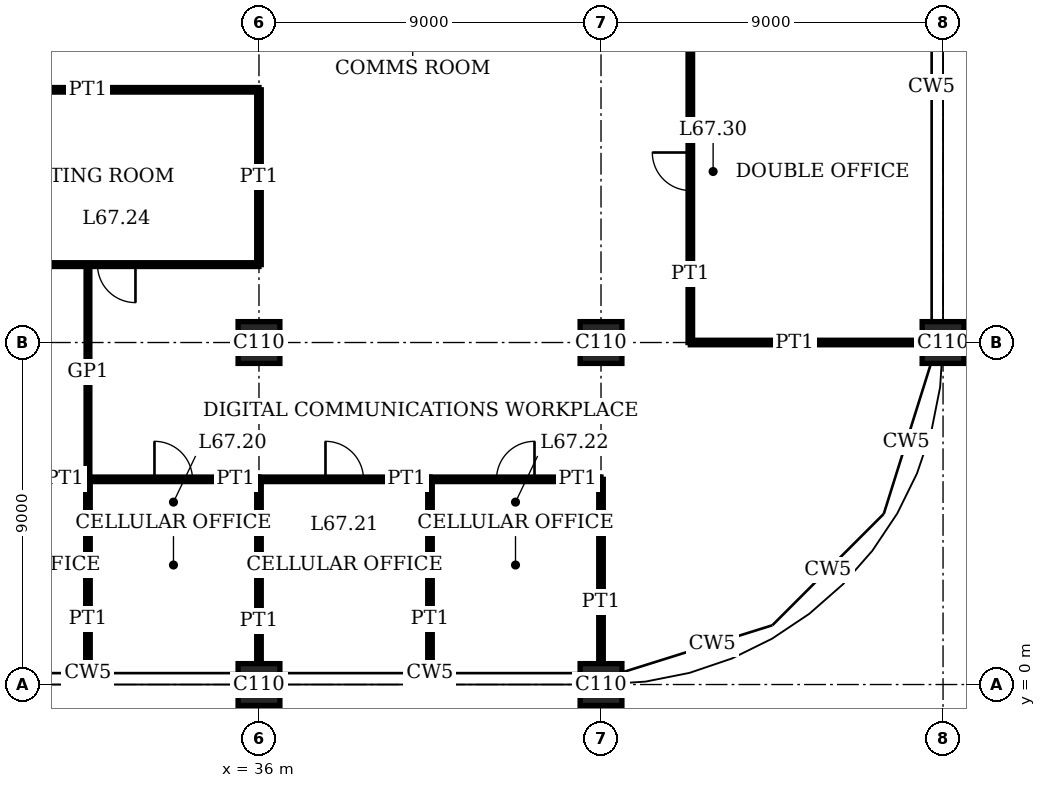
"""IFC4 building model, lengths in metres.
Left out: names, types, materials, properties, quantities, classifications, styles, units other than length and angle.
Written with IfcOpenShell. Run it as: python <this file> out.ifc"""

import sys

from ifc_helpers import new_model, si_unit, direction, frame, frame_2d, origin, origin_2d, place, context, subcontext, project, spatial, rectangle, extrude, element, fill, save


model = new_model("IFC4")
c1 = context("Model", 3, precision=1e-05, world=origin(), true_north=direction((0.0, 1.0)))
c2 = subcontext(c1, "Body", "Model", "MODEL_VIEW")
j1 = project(units=[si_unit("LENGTHUNIT", "METRE"), si_unit("PLANEANGLEUNIT", "RADIAN")], contexts=[c1])
p1 = place(None, origin())
s1 = spatial("IfcSite", under=j1, at=p1, CompositionType="ELEMENT")
p2 = place(p1, origin())
s2 = spatial("IfcBuilding", under=s1, at=p2, CompositionType="ELEMENT")
p3 = place(p2, frame((0.0, 0.0, 275.4)))
s3 = spatial("IfcBuildingStorey", under=s2, at=p3, CompositionType="ELEMENT", Elevation=275.4)
for number, where, z_axis, x_axis in (
    (1, (36.0, 0.0, 0.0), (0.0, 0.0, 1.0), (1.0, 0.0, 0.0)),
    (2, (36.0, 9.0, 0.0), (0.0, 0.0, 1.0), (1.0, 0.0, 0.0)),
    (3, (45.0, 0.0, 0.0), (0.0, 0.0, 1.0), (1.0, 0.0, 0.0)),
    (4, (45.0, 9.0, 0.0), (0.0, 0.0, 1.0), (1.0, 0.0, 0.0)),
    (5, (54.0, 9.0, 0.0), (0.0, 0.0, 1.0), (1.0, 0.0, 0.0)),
):
    element("IfcColumn", number, at=place(p3, frame(where, z_axis=z_axis, x_axis=x_axis)), inside=s3, PredefinedType="COLUMN", context=c2, shape_type="SweptSolid", body=[
        extrude(rectangle(XDim=1.1, YDim=1.1, at=origin_2d()), origin(), (0.0, 0.0, 1.0), 4.0),
    ])
p4 = place(p3, frame((27.0, 5.4, 0.0), z_axis=(0.0, 0.0, 1.0), x_axis=(1.0, 0.0, 0.0)))
e6 = element("IfcWall", 6, at=p4, inside=s3, PredefinedType="PARTITIONING", context=c2, shape_type="SweptSolid", body=[
    extrude(rectangle(XDim=4.5, YDim=0.12, at=frame_2d((2.25, 0.0))), origin(), (0.0, 0.0, 1.0), 3.75),
])
p5 = place(p4, frame((1.75, 0.0, 0.0)))
e7 = element("IfcOpeningElement", 7, at=p5, cuts=e6, PredefinedType="OPENING", context=c2, shape_type="SweptSolid", body=[
    extrude(rectangle(XDim=1.0, YDim=2.4, at=frame_2d((0.5, 1.2))), frame((0.0, 0.07, 0.0), z_axis=(0.0, -1.0, 0.0), x_axis=(1.0, 0.0, 0.0)), (0.0, 0.0, 1.0), 0.14),
])
p6 = place(p3, frame((31.5, 5.4, 0.0), z_axis=(0.0, 0.0, 1.0), x_axis=(1.0, 0.0, 0.0)))
e8 = element("IfcWall", 8, at=p6, inside=s3, PredefinedType="PARTITIONING", context=c2, shape_type="SweptSolid", body=[
    extrude(rectangle(XDim=4.5, YDim=0.12, at=frame_2d((2.25, 0.0))), origin(), (0.0, 0.0, 1.0), 3.75),
])
p7 = place(p6, frame((1.75, 0.0, 0.0)))
e9 = element("IfcOpeningElement", 9, at=p7, cuts=e8, PredefinedType="OPENING", context=c2, shape_type="SweptSolid", body=[
    extrude(rectangle(XDim=1.0, YDim=2.4, at=frame_2d((0.5, 1.2))), frame((0.0, 0.07, 0.0), z_axis=(0.0, -1.0, 0.0), x_axis=(1.0, 0.0, 0.0)), (0.0, 0.0, 1.0), 0.14),
])
p8 = place(p3, frame((36.0, 5.4, 0.0), z_axis=(0.0, 0.0, 1.0), x_axis=(1.0, 0.0, 0.0)))
e10 = element("IfcWall", 10, at=p8, inside=s3, PredefinedType="PARTITIONING", context=c2, shape_type="SweptSolid", body=[
    extrude(rectangle(XDim=4.5, YDim=0.12, at=frame_2d((2.25, 0.0))), origin(), (0.0, 0.0, 1.0), 3.75),
])
p9 = place(p8, frame((1.75, 0.0, 0.0)))
e11 = element("IfcOpeningElement", 11, at=p9, cuts=e10, PredefinedType="OPENING", context=c2, shape_type="SweptSolid", body=[
    extrude(rectangle(XDim=1.0, YDim=2.4, at=frame_2d((0.5, 1.2))), frame((0.0, 0.07, 0.0), z_axis=(0.0, -1.0, 0.0), x_axis=(1.0, 0.0, 0.0)), (0.0, 0.0, 1.0), 0.14),
])
p10 = place(p3, frame((40.5, 5.4, 0.0), z_axis=(0.0, 0.0, 1.0), x_axis=(1.0, 0.0, 0.0)))
e12 = element("IfcWall", 12, at=p10, inside=s3, PredefinedType="PARTITIONING", context=c2, shape_type="SweptSolid", body=[
    extrude(rectangle(XDim=4.5, YDim=0.12, at=frame_2d((2.25, 0.0))), origin(), (0.0, 0.0, 1.0), 3.75),
])
p11 = place(p10, frame((1.75, 0.0, 0.0)))
e13 = element("IfcOpeningElement", 13, at=p11, cuts=e12, PredefinedType="OPENING", context=c2, shape_type="SweptSolid", body=[
    extrude(rectangle(XDim=1.0, YDim=2.4, at=frame_2d((0.5, 1.2))), frame((0.0, 0.07, 0.0), z_axis=(0.0, -1.0, 0.0), x_axis=(1.0, 0.0, 0.0)), (0.0, 0.0, 1.0), 0.14),
])
p12 = place(p3, frame((47.35, 9.0, 0.0), z_axis=(0.0, 0.0, 1.0), x_axis=(1.0, 0.0, 0.0)))
e14 = element("IfcWall", 14, at=p12, inside=s3, PredefinedType="PARTITIONING", context=c2, shape_type="SweptSolid", body=[
    extrude(rectangle(XDim=6.1, YDim=0.12, at=frame_2d((3.05, 0.0))), origin(), (0.0, 0.0, 1.0), 3.05),
])
p13 = place(p3, frame((27.0, 11.05, 0.0), z_axis=(0.0, 0.0, 1.0), x_axis=(1.0, 0.0, 0.0)))
e15 = element("IfcWall", 15, at=p13, inside=s3, PredefinedType="PARTITIONING", context=c2, shape_type="SweptSolid", body=[
    extrude(rectangle(XDim=9.0, YDim=0.1, at=frame_2d((4.5, 0.0))), origin(), (0.0, 0.0, 1.0), 3.75),
])
p14 = place(p13, frame((4.75, 0.0, 0.0)))
e16 = element("IfcOpeningElement", 16, at=p14, cuts=e15, PredefinedType="OPENING", context=c2, shape_type="SweptSolid", body=[
    extrude(rectangle(XDim=1.0, YDim=2.4, at=frame_2d((0.5, 1.2))), frame((0.0, 0.06, 0.0), z_axis=(0.0, -1.0, 0.0), x_axis=(1.0, 0.0, 0.0)), (0.0, 0.0, 1.0), 0.12),
])
p15 = place(p3, frame((27.0, 15.65, 0.0), z_axis=(0.0, 0.0, 1.0), x_axis=(1.0, 0.0, 0.0)))
e17 = element("IfcWall", 17, at=p15, inside=s3, PredefinedType="PARTITIONING", context=c2, shape_type="SweptSolid", body=[
    extrude(rectangle(XDim=9.0, YDim=0.12, at=frame_2d((4.5, 0.0))), origin(), (0.0, 0.0, 1.0), 3.75),
])
p16 = place(p3, frame((31.5, 0.31, 0.0), z_axis=(0.0, 0.0, 1.0), x_axis=(0.0, 1.0, 0.0)))
e18 = element("IfcWall", 18, at=p16, inside=s3, PredefinedType="PARTITIONING", context=c2, shape_type="SweptSolid", body=[
    extrude(rectangle(XDim=5.09, YDim=0.12, at=frame_2d((2.545, 0.0))), origin(), (0.0, 0.0, 1.0), 3.75),
])
p17 = place(p3, frame((31.5, 5.4, 0.0), z_axis=(0.0, 0.0, 1.0), x_axis=(0.0, 1.0, 0.0)))
e19 = element("IfcWall", 19, at=p17, inside=s3, PredefinedType="PARTITIONING", context=c2, shape_type="SweptSolid", body=[
    extrude(rectangle(XDim=5.66, YDim=0.1, at=frame_2d((2.83, 0.0))), origin(), (0.0, 0.0, 1.0), 3.75),
])
p18 = place(p3, frame((36.0, 0.55, 0.0), z_axis=(0.0, 0.0, 1.0), x_axis=(0.0, 1.0, 0.0)))
e20 = element("IfcWall", 20, at=p18, inside=s3, PredefinedType="PARTITIONING", context=c2, shape_type="SweptSolid", body=[
    extrude(rectangle(XDim=4.85, YDim=0.12, at=frame_2d((2.425, 0.0))), origin(), (0.0, 0.0, 1.0), 3.05),
])
p19 = place(p3, frame((36.0, 11.05, 0.0), z_axis=(0.0, 0.0, 1.0), x_axis=(0.0, 1.0, 0.0)))
e21 = element("IfcWall", 21, at=p19, inside=s3, PredefinedType="PARTITIONING", context=c2, shape_type="SweptSolid", body=[
    extrude(rectangle(XDim=4.6, YDim=0.12, at=frame_2d((2.3, 0.0))), origin(), (0.0, 0.0, 1.0), 3.05),
])
p20 = place(p3, frame((40.5, 0.31, 0.0), z_axis=(0.0, 0.0, 1.0), x_axis=(0.0, 1.0, 0.0)))
e22 = element("IfcWall", 22, at=p20, inside=s3, PredefinedType="PARTITIONING", context=c2, shape_type="SweptSolid", body=[
    extrude(rectangle(XDim=5.09, YDim=0.12, at=frame_2d((2.545, 0.0))), origin(), (0.0, 0.0, 1.0), 3.75),
])
p21 = place(p3, frame((45.0, 0.55, 0.0), z_axis=(0.0, 0.0, 1.0), x_axis=(0.0, 1.0, 0.0)))
e23 = element("IfcWall", 23, at=p21, inside=s3, PredefinedType="PARTITIONING", context=c2, shape_type="SweptSolid", body=[
    extrude(rectangle(XDim=4.85, YDim=0.12, at=frame_2d((2.425, 0.0))), origin(), (0.0, 0.0, 1.0), 3.05),
])
p22 = place(p3, frame((47.35, 9.0, 0.0), z_axis=(0.0, 0.0, 1.0), x_axis=(0.0, 1.0, 0.0)))
e24 = element("IfcWall", 24, at=p22, inside=s3, PredefinedType="PARTITIONING", context=c2, shape_type="SweptSolid", body=[
    extrude(rectangle(XDim=9.0, YDim=0.12, at=frame_2d((4.5, 0.0))), origin(), (0.0, 0.0, 1.0), 3.75),
])
p23 = place(p22, frame((4.0, 0.0, 0.0)))
e25 = element("IfcOpeningElement", 25, at=p23, cuts=e24, PredefinedType="OPENING", context=c2, shape_type="SweptSolid", body=[
    extrude(rectangle(XDim=1.0, YDim=2.4, at=frame_2d((0.5, 1.2))), frame((0.0, 0.07, 0.0), z_axis=(0.0, -1.0, 0.0), x_axis=(1.0, 0.0, 0.0)), (0.0, 0.0, 1.0), 0.14),
])
p24 = place(p7, origin())
e26 = element("IfcDoor", 26, at=p24, inside=s3, OperationType="SINGLE_SWING_RIGHT", PredefinedType="DOOR", context=c2, shape_type="SweptSolid", body=[
    extrude(rectangle(XDim=1.0, YDim=2.4, at=frame_2d((0.5, 1.2))), frame((0.0, 0.025, 0.0), z_axis=(0.0, -1.0, 0.0), x_axis=(1.0, 0.0, 0.0)), (0.0, 0.0, 1.0), 0.05),
])
fill(e9, e26)
p25 = place(p9, origin())
e27 = element("IfcDoor", 27, at=p25, inside=s3, OperationType="SINGLE_SWING_RIGHT", PredefinedType="DOOR", context=c2, shape_type="SweptSolid", body=[
    extrude(rectangle(XDim=1.0, YDim=2.4, at=frame_2d((0.5, 1.2))), frame((0.0, 0.025, 0.0), z_axis=(0.0, -1.0, 0.0), x_axis=(1.0, 0.0, 0.0)), (0.0, 0.0, 1.0), 0.05),
])
fill(e11, e27)
p26 = place(p11, origin())
e28 = element("IfcDoor", 28, at=p26, inside=s3, OperationType="SINGLE_SWING_LEFT", PredefinedType="DOOR", context=c2, shape_type="SweptSolid", body=[
    extrude(rectangle(XDim=1.0, YDim=2.4, at=frame_2d((0.5, 1.2))), frame((0.0, 0.025, 0.0), z_axis=(0.0, -1.0, 0.0), x_axis=(1.0, 0.0, 0.0)), (0.0, 0.0, 1.0), 0.05),
])
fill(e13, e28)
p27 = place(p14, origin())
e29 = element("IfcDoor", 29, at=p27, inside=s3, OperationType="SINGLE_SWING_RIGHT", PredefinedType="DOOR", context=c2, shape_type="SweptSolid", body=[
    extrude(rectangle(XDim=1.0, YDim=2.4, at=frame_2d((0.5, 1.2))), frame((0.0, 0.02, 0.0), z_axis=(0.0, -1.0, 0.0), x_axis=(1.0, 0.0, 0.0)), (0.0, 0.0, 1.0), 0.04),
])
fill(e16, e29)
p28 = place(p23, origin())
e30 = element("IfcDoor", 30, at=p28, inside=s3, OperationType="SINGLE_SWING_LEFT", PredefinedType="DOOR", context=c2, shape_type="SweptSolid", body=[
    extrude(rectangle(XDim=1.0, YDim=2.4, at=frame_2d((0.5, 1.2))), frame((0.0, 0.025, 0.0), z_axis=(0.0, -1.0, 0.0), x_axis=(1.0, 0.0, 0.0)), (0.0, 0.0, 1.0), 0.05),
])
fill(e25, e30)
save(model, sys.argv[1])
